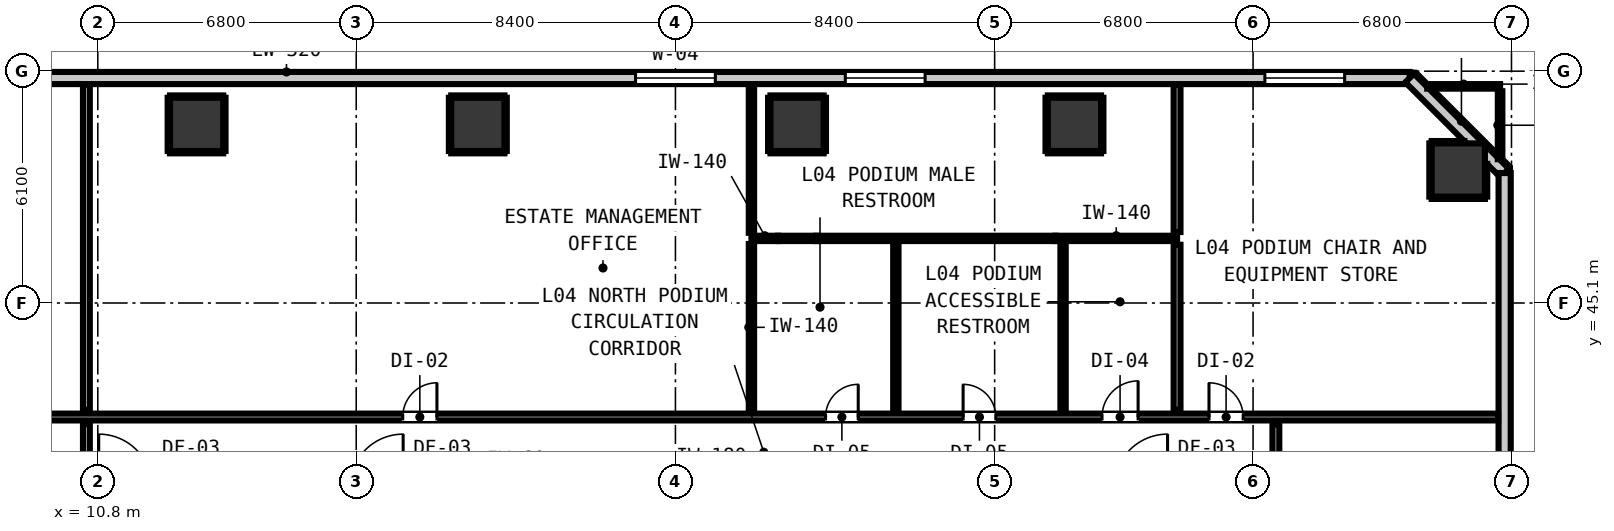
"""IFC4 building model, lengths in metres.
Left out: names, types, materials, properties, quantities, classifications, styles, units other than length and angle.
Written with IfcOpenShell. Run it as: python <this file> out.ifc"""

import sys

from ifc_helpers import new_model, si_unit, direction, frame, frame_2d, origin, origin_2d, place, context, subcontext, project, spatial, rectangle, extrude, element, fill, save


model = new_model("IFC4")
c1 = context("Model", 3, precision=1e-05, world=origin(), true_north=direction((0.0, 1.0)))
c2 = subcontext(c1, "Body", "Model", "MODEL_VIEW")
j1 = project(units=[si_unit("LENGTHUNIT", "METRE"), si_unit("PLANEANGLEUNIT", "RADIAN")], contexts=[c1])
p1 = place(None, origin())
s1 = spatial("IfcSite", under=j1, at=p1, CompositionType="ELEMENT")
p2 = place(p1, origin())
s2 = spatial("IfcBuilding", under=s1, at=p2, CompositionType="ELEMENT")
p3 = place(p2, frame((0.0, 0.0, 17.8)))
s3 = spatial("IfcBuildingStorey", under=s2, at=p3, CompositionType="ELEMENT", Elevation=17.8)
for number, where, z_axis, x_axis in (
    (1, (13.4, 49.8, 0.0), (0.0, 0.0, 1.0), (1.0, 0.0, 0.0)),
    (2, (20.8, 49.8, 0.0), (0.0, 0.0, 1.0), (1.0, 0.0, 0.0)),
    (3, (29.2, 49.8, 0.0), (0.0, 0.0, 1.0), (1.0, 0.0, 0.0)),
    (4, (36.5, 49.8, 0.0), (0.0, 0.0, 1.0), (1.0, 0.0, 0.0)),
    (5, (46.6, 48.6, 0.0), (0.0, 0.0, 1.0), (1.0, 0.0, 0.0)),
):
    element("IfcColumn", number, at=place(p3, frame(where, z_axis=z_axis, x_axis=x_axis)), inside=s3, PredefinedType="COLUMN", context=c2, shape_type="SweptSolid", body=[
        extrude(rectangle(XDim=1.4, YDim=1.4, at=origin_2d()), origin(), (0.0, 0.0, 1.0), 3.78),
    ])
p4 = place(p3, frame((6.68, 51.02, 0.0), z_axis=(0.0, 0.0, 1.0), x_axis=(1.0, 0.0, 0.0)))
e6 = element("IfcWall", 6, at=p4, inside=s3, PredefinedType="STANDARD", context=c2, shape_type="SweptSolid", body=[
    extrude(rectangle(XDim=38.64, YDim=0.32, at=frame_2d((19.32, 0.0))), origin(), (0.0, 0.0, 1.0), 3.78),
])
p5 = place(p4, frame((18.27, 0.0, 0.9)))
e7 = element("IfcOpeningElement", 7, at=p5, cuts=e6, PredefinedType="OPENING", context=c2, shape_type="SweptSolid", body=[
    extrude(rectangle(XDim=2.1, YDim=1.9, at=frame_2d((1.05, 0.95))), frame((0.0, 0.17, 0.0), z_axis=(0.0, -1.0, 0.0), x_axis=(1.0, 0.0, 0.0)), (0.0, 0.0, 1.0), 0.34),
])
p6 = place(p4, frame((23.79, 0.0, 0.9)))
e8 = element("IfcOpeningElement", 8, at=p6, cuts=e6, PredefinedType="OPENING", context=c2, shape_type="SweptSolid", body=[
    extrude(rectangle(XDim=2.1, YDim=1.9, at=frame_2d((1.05, 0.95))), frame((0.0, 0.17, 0.0), z_axis=(0.0, -1.0, 0.0), x_axis=(1.0, 0.0, 0.0)), (0.0, 0.0, 1.0), 0.34),
])
p7 = place(p4, frame((34.83, 0.0, 0.9)))
e9 = element("IfcOpeningElement", 9, at=p7, cuts=e6, PredefinedType="OPENING", context=c2, shape_type="SweptSolid", body=[
    extrude(rectangle(XDim=2.1, YDim=1.9, at=frame_2d((1.05, 0.95))), frame((0.0, 0.17, 0.0), z_axis=(0.0, -1.0, 0.0), x_axis=(1.0, 0.0, 0.0)), (0.0, 0.0, 1.0), 0.34),
])
p8 = place(p3, frame((45.32, 51.02, 0.0), z_axis=(0.0, 0.0, 1.0), x_axis=(0.707106781187, -0.707106781187, 0.0)))
e10 = element("IfcWall", 10, at=p8, inside=s3, PredefinedType="STANDARD", context=c2, shape_type="SweptSolid", body=[
    extrude(rectangle(XDim=3.536, YDim=0.32, at=frame_2d((1.768, 0.0))), origin(), (0.0, 0.0, 1.0), 3.78),
])
p9 = place(p3, frame((47.82, 48.52, 0.0), z_axis=(0.0, 0.0, 1.0), x_axis=(0.0, -1.0, 0.0)))
e11 = element("IfcWall", 11, at=p9, inside=s3, PredefinedType="STANDARD", context=c2, shape_type="SweptSolid", body=[
    extrude(rectangle(XDim=8.12, YDim=0.32, at=frame_2d((4.06, 0.0))), origin(), (0.0, 0.0, 1.0), 3.78),
])
p10 = place(p3, frame((4.352, 42.1, 0.0), z_axis=(0.0, 0.0, 1.0), x_axis=(1.0, 0.0, 0.0)))
e12 = element("IfcWall", 12, at=p10, inside=s3, PredefinedType="PARTITIONING", context=c2, shape_type="SweptSolid", body=[
    extrude(rectangle(XDim=43.296, YDim=0.18, at=frame_2d((21.648, 0.0))), origin(), (0.0, 0.0, 1.0), 3.78),
])
p11 = place(p10, frame((14.472, 0.0, 0.0)))
e13 = element("IfcOpeningElement", 13, at=p11, cuts=e12, PredefinedType="OPENING", context=c2, shape_type="SweptSolid", body=[
    extrude(rectangle(XDim=0.9, YDim=2.1, at=frame_2d((0.45, 1.05))), frame((0.0, 0.1, 0.0), z_axis=(0.0, -1.0, 0.0), x_axis=(1.0, 0.0, 0.0)), (0.0, 0.0, 1.0), 0.2),
])
p12 = place(p10, frame((25.598, 0.0, 0.0)))
e14 = element("IfcOpeningElement", 14, at=p12, cuts=e12, PredefinedType="OPENING", context=c2, shape_type="SweptSolid", body=[
    extrude(rectangle(XDim=0.86, YDim=2.02, at=frame_2d((0.43, 1.01))), frame((0.0, 0.1, 0.0), z_axis=(0.0, -1.0, 0.0), x_axis=(1.0, 0.0, 0.0)), (0.0, 0.0, 1.0), 0.2),
])
p13 = place(p10, frame((29.218, 0.0, 0.0)))
e15 = element("IfcOpeningElement", 15, at=p13, cuts=e12, PredefinedType="OPENING", context=c2, shape_type="SweptSolid", body=[
    extrude(rectangle(XDim=0.86, YDim=2.02, at=frame_2d((0.43, 1.01))), frame((0.0, 0.1, 0.0), z_axis=(0.0, -1.0, 0.0), x_axis=(1.0, 0.0, 0.0)), (0.0, 0.0, 1.0), 0.2),
])
p14 = place(p10, frame((32.873, 0.0, 0.0)))
e16 = element("IfcOpeningElement", 16, at=p14, cuts=e12, PredefinedType="OPENING", context=c2, shape_type="SweptSolid", body=[
    extrude(rectangle(XDim=0.95, YDim=2.1, at=frame_2d((0.475, 1.05))), frame((0.0, 0.1, 0.0), z_axis=(0.0, -1.0, 0.0), x_axis=(1.0, 0.0, 0.0)), (0.0, 0.0, 1.0), 0.2),
])
p15 = place(p10, frame((35.688, 0.0, 0.0)))
e17 = element("IfcOpeningElement", 17, at=p15, cuts=e12, PredefinedType="OPENING", context=c2, shape_type="SweptSolid", body=[
    extrude(rectangle(XDim=0.9, YDim=2.1, at=frame_2d((0.45, 1.05))), frame((0.0, 0.1, 0.0), z_axis=(0.0, -1.0, 0.0), x_axis=(1.0, 0.0, 0.0)), (0.0, 0.0, 1.0), 0.2),
])
p16 = place(p3, frame((28.0, 46.8, 0.0), z_axis=(0.0, 0.0, 1.0), x_axis=(1.0, 0.0, 0.0)))
e18 = element("IfcWall", 18, at=p16, inside=s3, PredefinedType="PARTITIONING", context=c2, shape_type="SweptSolid", body=[
    extrude(rectangle(XDim=0.7, YDim=0.14, at=frame_2d((0.35, 0.0))), origin(), (0.0, 0.0, 1.0), 3.165),
])
p17 = place(p3, frame((28.7, 46.8, 0.0), z_axis=(0.0, 0.0, 1.0), x_axis=(1.0, 0.0, 0.0)))
e19 = element("IfcWall", 19, at=p17, inside=s3, PredefinedType="PARTITIONING", context=c2, shape_type="SweptSolid", body=[
    extrude(rectangle(XDim=1.0, YDim=0.14, at=frame_2d((0.5, 0.0))), origin(), (0.0, 0.0, 1.0), 3.78),
])
p18 = place(p3, frame((29.7, 46.8, 0.0), z_axis=(0.0, 0.0, 1.0), x_axis=(1.0, 0.0, 0.0)))
e20 = element("IfcWall", 20, at=p18, inside=s3, PredefinedType="PARTITIONING", context=c2, shape_type="SweptSolid", body=[
    extrude(rectangle(XDim=6.3, YDim=0.14, at=frame_2d((3.15, 0.0))), origin(), (0.0, 0.0, 1.0), 3.165),
])
p19 = place(p3, frame((36.0, 46.8, 0.0), z_axis=(0.0, 0.0, 1.0), x_axis=(1.0, 0.0, 0.0)))
e21 = element("IfcWall", 21, at=p19, inside=s3, PredefinedType="PARTITIONING", context=c2, shape_type="SweptSolid", body=[
    extrude(rectangle(XDim=3.2, YDim=0.14, at=frame_2d((1.6, 0.0))), origin(), (0.0, 0.0, 1.0), 3.78),
])
p20 = place(p3, frame((45.783, 50.8, 0.0), z_axis=(0.0, 0.0, 1.0), x_axis=(1.0, 0.0, 0.0)))
e22 = element("IfcWall", 22, at=p20, inside=s3, PredefinedType="PARTITIONING", context=c2, shape_type="SweptSolid", body=[
    extrude(rectangle(XDim=1.917, YDim=0.12, at=frame_2d((0.958, 0.0))), origin(), (0.0, 0.0, 1.0), 3.78),
])
p21 = place(p3, frame((10.5, 40.438, 0.0), z_axis=(0.0, 0.0, 1.0), x_axis=(0.0, 1.0, 0.0)))
e23 = element("IfcWall", 23, at=p21, inside=s3, PredefinedType="PARTITIONING", context=c2, shape_type="SweptSolid", body=[
    extrude(rectangle(XDim=1.474, YDim=0.18, at=frame_2d((0.737, 0.0))), origin(), (0.0, 0.0, 1.0), 3.78),
])
p22 = place(p3, frame((10.5, 42.288, 0.0), z_axis=(0.0, 0.0, 1.0), x_axis=(0.0, 1.0, 0.0)))
e24 = element("IfcWall", 24, at=p22, inside=s3, PredefinedType="PARTITIONING", context=c2, shape_type="SweptSolid", body=[
    extrude(rectangle(XDim=8.56, YDim=0.18, at=frame_2d((4.28, 0.0))), origin(), (0.0, 0.0, 1.0), 3.78),
])
p23 = place(p3, frame((39.2, 42.288, 0.0), z_axis=(0.0, 0.0, 1.0), x_axis=(0.0, 1.0, 0.0)))
e25 = element("IfcWall", 25, at=p23, inside=s3, PredefinedType="PARTITIONING", context=c2, shape_type="SweptSolid", body=[
    extrude(rectangle(XDim=4.344, YDim=0.18, at=frame_2d((2.172, 0.0))), origin(), (0.0, 0.0, 1.0), 3.78),
])
p24 = place(p3, frame((39.2, 46.968, 0.0), z_axis=(0.0, 0.0, 1.0), x_axis=(0.0, 1.0, 0.0)))
e26 = element("IfcWall", 26, at=p24, inside=s3, PredefinedType="PARTITIONING", context=c2, shape_type="SweptSolid", body=[
    extrude(rectangle(XDim=3.88, YDim=0.18, at=frame_2d((1.94, 0.0))), origin(), (0.0, 0.0, 1.0), 3.78),
])
p25 = place(p3, frame((41.8, 40.438, 0.0), z_axis=(0.0, 0.0, 1.0), x_axis=(0.0, 1.0, 0.0)))
e27 = element("IfcWall", 27, at=p25, inside=s3, PredefinedType="PARTITIONING", context=c2, shape_type="SweptSolid", body=[
    extrude(rectangle(XDim=1.474, YDim=0.18, at=frame_2d((0.737, 0.0))), origin(), (0.0, 0.0, 1.0), 3.78),
])
p26 = place(p3, frame((28.0, 42.268, 0.0), z_axis=(0.0, 0.0, 1.0), x_axis=(0.0, 1.0, 0.0)))
e28 = element("IfcWall", 28, at=p26, inside=s3, PredefinedType="PARTITIONING", context=c2, shape_type="SweptSolid", body=[
    extrude(rectangle(XDim=4.384, YDim=0.14, at=frame_2d((2.192, 0.0))), origin(), (0.0, 0.0, 1.0), 3.78),
])
p27 = place(p3, frame((28.0, 46.948, 0.0), z_axis=(0.0, 0.0, 1.0), x_axis=(0.0, 1.0, 0.0)))
e29 = element("IfcWall", 29, at=p27, inside=s3, PredefinedType="PARTITIONING", context=c2, shape_type="SweptSolid", body=[
    extrude(rectangle(XDim=3.9, YDim=0.14, at=frame_2d((1.95, 0.0))), origin(), (0.0, 0.0, 1.0), 3.78),
])
p28 = place(p3, frame((31.8, 42.268, 0.0), z_axis=(0.0, 0.0, 1.0), x_axis=(0.0, 1.0, 0.0)))
e30 = element("IfcWall", 30, at=p28, inside=s3, PredefinedType="PARTITIONING", context=c2, shape_type="SweptSolid", body=[
    extrude(rectangle(XDim=4.384, YDim=0.14, at=frame_2d((2.192, 0.0))), origin(), (0.0, 0.0, 1.0), 3.78),
])
p29 = place(p3, frame((36.2, 42.268, 0.0), z_axis=(0.0, 0.0, 1.0), x_axis=(0.0, 1.0, 0.0)))
e31 = element("IfcWall", 31, at=p29, inside=s3, PredefinedType="PARTITIONING", context=c2, shape_type="SweptSolid", body=[
    extrude(rectangle(XDim=4.384, YDim=0.14, at=frame_2d((2.192, 0.0))), origin(), (0.0, 0.0, 1.0), 1.785),
])
p30 = place(p3, frame((47.7, 48.883, 0.0), z_axis=(0.0, 0.0, 1.0), x_axis=(0.0, 1.0, 0.0)))
e32 = element("IfcWall", 32, at=p30, inside=s3, PredefinedType="PARTITIONING", context=c2, shape_type="SweptSolid", body=[
    extrude(rectangle(XDim=1.789, YDim=0.12, at=frame_2d((0.895, 0.0))), origin(), (0.0, 0.0, 1.0), 3.78),
])
for number, where, z_axis, x_axis in (
    (33, (12.7, 49.068, 0.0), (0.0, 0.0, 1.0), (1.0, 0.0, 0.0)),
    (34, (12.7, 50.532, 0.0), (0.0, 0.0, 1.0), (1.0, 0.0, 0.0)),
):
    element("IfcWall", number, at=place(p3, frame(where, z_axis=z_axis, x_axis=x_axis)), inside=s3, PredefinedType="PARTITIONING", context=c2, shape_type="SweptSolid", body=[
        extrude(rectangle(XDim=1.4, YDim=0.06, at=frame_2d((0.7, 0.0))), origin(), (0.0, 0.0, 1.0), 1.45),
    ])
for number, where, z_axis, x_axis in (
    (35, (12.668, 49.1, 0.0), (0.0, 0.0, 1.0), (0.0, 1.0, 0.0)),
    (36, (14.132, 49.1, 0.0), (0.0, 0.0, 1.0), (0.0, 1.0, 0.0)),
    (37, (20.1, 49.068, 0.0), (0.0, 0.0, 1.0), (1.0, 0.0, 0.0)),
    (38, (20.1, 50.532, 0.0), (0.0, 0.0, 1.0), (1.0, 0.0, 0.0)),
    (39, (20.068, 49.1, 0.0), (0.0, 0.0, 1.0), (0.0, 1.0, 0.0)),
    (40, (21.532, 49.1, 0.0), (0.0, 0.0, 1.0), (0.0, 1.0, 0.0)),
    (41, (28.5, 49.068, 0.0), (0.0, 0.0, 1.0), (1.0, 0.0, 0.0)),
    (42, (28.5, 50.532, 0.0), (0.0, 0.0, 1.0), (1.0, 0.0, 0.0)),
    (43, (28.468, 49.1, 0.0), (0.0, 0.0, 1.0), (0.0, 1.0, 0.0)),
    (44, (29.932, 49.1, 0.0), (0.0, 0.0, 1.0), (0.0, 1.0, 0.0)),
    (45, (35.8, 49.068, 0.0), (0.0, 0.0, 1.0), (1.0, 0.0, 0.0)),
    (46, (35.8, 50.532, 0.0), (0.0, 0.0, 1.0), (1.0, 0.0, 0.0)),
    (47, (35.768, 49.1, 0.0), (0.0, 0.0, 1.0), (0.0, 1.0, 0.0)),
    (48, (37.232, 49.1, 0.0), (0.0, 0.0, 1.0), (0.0, 1.0, 0.0)),
):
    element("IfcWall", number, at=place(p3, frame(where, z_axis=z_axis, x_axis=x_axis)), inside=s3, PredefinedType="PARTITIONING", context=c2, shape_type="SweptSolid", body=[
        extrude(rectangle(XDim=1.4, YDim=0.06, at=frame_2d((0.7, 0.0))), origin(), (0.0, 0.0, 1.0), 1.45),
    ])
p31 = place(p3, frame((45.9, 47.868, 0.0), z_axis=(0.0, 0.0, 1.0), x_axis=(1.0, 0.0, 0.0)))
e49 = element("IfcWall", 49, at=p31, inside=s3, PredefinedType="PARTITIONING", context=c2, shape_type="SweptSolid", body=[
    extrude(rectangle(XDim=1.4, YDim=0.06, at=frame_2d((0.7, 0.0))), origin(), (0.0, 0.0, 1.0), 1.45),
])
p32 = place(p3, frame((45.9, 49.332, 0.0), z_axis=(0.0, 0.0, 1.0), x_axis=(1.0, 0.0, 0.0)))
e50 = element("IfcWall", 50, at=p32, inside=s3, PredefinedType="PARTITIONING", context=c2, shape_type="SweptSolid", body=[
    extrude(rectangle(XDim=0.861, YDim=0.06, at=frame_2d((0.431, 0.0))), origin(), (0.0, 0.0, 1.0), 1.45),
])
p33 = place(p3, frame((45.868, 47.9, 0.0), z_axis=(0.0, 0.0, 1.0), x_axis=(0.0, 1.0, 0.0)))
e51 = element("IfcWall", 51, at=p33, inside=s3, PredefinedType="PARTITIONING", context=c2, shape_type="SweptSolid", body=[
    extrude(rectangle(XDim=1.4, YDim=0.06, at=frame_2d((0.7, 0.0))), origin(), (0.0, 0.0, 1.0), 1.45),
])
p34 = place(p3, frame((47.332, 47.9, 0.0), z_axis=(0.0, 0.0, 1.0), x_axis=(0.0, 1.0, 0.0)))
e52 = element("IfcWall", 52, at=p34, inside=s3, PredefinedType="PARTITIONING", context=c2, shape_type="SweptSolid", body=[
    extrude(rectangle(XDim=0.861, YDim=0.06, at=frame_2d((0.431, 0.0))), origin(), (0.0, 0.0, 1.0), 1.45),
])
p35 = place(p5, origin())
e53 = element("IfcWindow", 53, at=p35, inside=s3, PartitioningType="SINGLE_PANEL", PredefinedType="WINDOW", context=c2, shape_type="SweptSolid", body=[
    extrude(rectangle(XDim=2.1, YDim=1.9, at=frame_2d((1.05, 0.95))), frame((0.0, 0.03, 0.0), z_axis=(0.0, -1.0, 0.0), x_axis=(1.0, 0.0, 0.0)), (0.0, 0.0, 1.0), 0.06),
])
fill(e7, e53)
p36 = place(p6, origin())
e54 = element("IfcWindow", 54, at=p36, inside=s3, PartitioningType="SINGLE_PANEL", PredefinedType="WINDOW", context=c2, shape_type="SweptSolid", body=[
    extrude(rectangle(XDim=2.1, YDim=1.9, at=frame_2d((1.05, 0.95))), frame((0.0, 0.03, 0.0), z_axis=(0.0, -1.0, 0.0), x_axis=(1.0, 0.0, 0.0)), (0.0, 0.0, 1.0), 0.06),
])
fill(e8, e54)
p37 = place(p7, origin())
e55 = element("IfcWindow", 55, at=p37, inside=s3, PartitioningType="SINGLE_PANEL", PredefinedType="WINDOW", context=c2, shape_type="SweptSolid", body=[
    extrude(rectangle(XDim=2.1, YDim=1.9, at=frame_2d((1.05, 0.95))), frame((0.0, 0.03, 0.0), z_axis=(0.0, -1.0, 0.0), x_axis=(1.0, 0.0, 0.0)), (0.0, 0.0, 1.0), 0.06),
])
fill(e9, e55)
p38 = place(p11, origin())
e56 = element("IfcDoor", 56, at=p38, inside=s3, OperationType="SINGLE_SWING_RIGHT", PredefinedType="DOOR", context=c2, shape_type="SweptSolid", body=[
    extrude(rectangle(XDim=0.9, YDim=2.1, at=frame_2d((0.45, 1.05))), frame((0.0, 0.025, 0.0), z_axis=(0.0, -1.0, 0.0), x_axis=(1.0, 0.0, 0.0)), (0.0, 0.0, 1.0), 0.05),
])
fill(e13, e56)
p39 = place(p12, origin())
e57 = element("IfcDoor", 57, at=p39, inside=s3, OperationType="SINGLE_SWING_RIGHT", PredefinedType="DOOR", context=c2, shape_type="SweptSolid", body=[
    extrude(rectangle(XDim=0.86, YDim=2.02, at=frame_2d((0.43, 1.01))), frame((0.0, 0.025, 0.0), z_axis=(0.0, -1.0, 0.0), x_axis=(1.0, 0.0, 0.0)), (0.0, 0.0, 1.0), 0.05),
])
fill(e14, e57)
p40 = place(p13, origin())
e58 = element("IfcDoor", 58, at=p40, inside=s3, OperationType="SINGLE_SWING_LEFT", PredefinedType="DOOR", context=c2, shape_type="SweptSolid", body=[
    extrude(rectangle(XDim=0.86, YDim=2.02, at=frame_2d((0.43, 1.01))), frame((0.0, 0.025, 0.0), z_axis=(0.0, -1.0, 0.0), x_axis=(1.0, 0.0, 0.0)), (0.0, 0.0, 1.0), 0.05),
])
fill(e15, e58)
p41 = place(p14, origin())
e59 = element("IfcDoor", 59, at=p41, inside=s3, OperationType="SINGLE_SWING_RIGHT", PredefinedType="DOOR", context=c2, shape_type="SweptSolid", body=[
    extrude(rectangle(XDim=0.95, YDim=2.1, at=frame_2d((0.475, 1.05))), frame((0.0, 0.025, 0.0), z_axis=(0.0, -1.0, 0.0), x_axis=(1.0, 0.0, 0.0)), (0.0, 0.0, 1.0), 0.05),
])
fill(e16, e59)
p42 = place(p15, origin())
e60 = element("IfcDoor", 60, at=p42, inside=s3, OperationType="SINGLE_SWING_LEFT", PredefinedType="DOOR", context=c2, shape_type="SweptSolid", body=[
    extrude(rectangle(XDim=0.9, YDim=2.1, at=frame_2d((0.45, 1.05))), frame((0.0, 0.025, 0.0), z_axis=(0.0, -1.0, 0.0), x_axis=(1.0, 0.0, 0.0)), (0.0, 0.0, 1.0), 0.05),
])
fill(e17, e60)
save(model, sys.argv[1])
